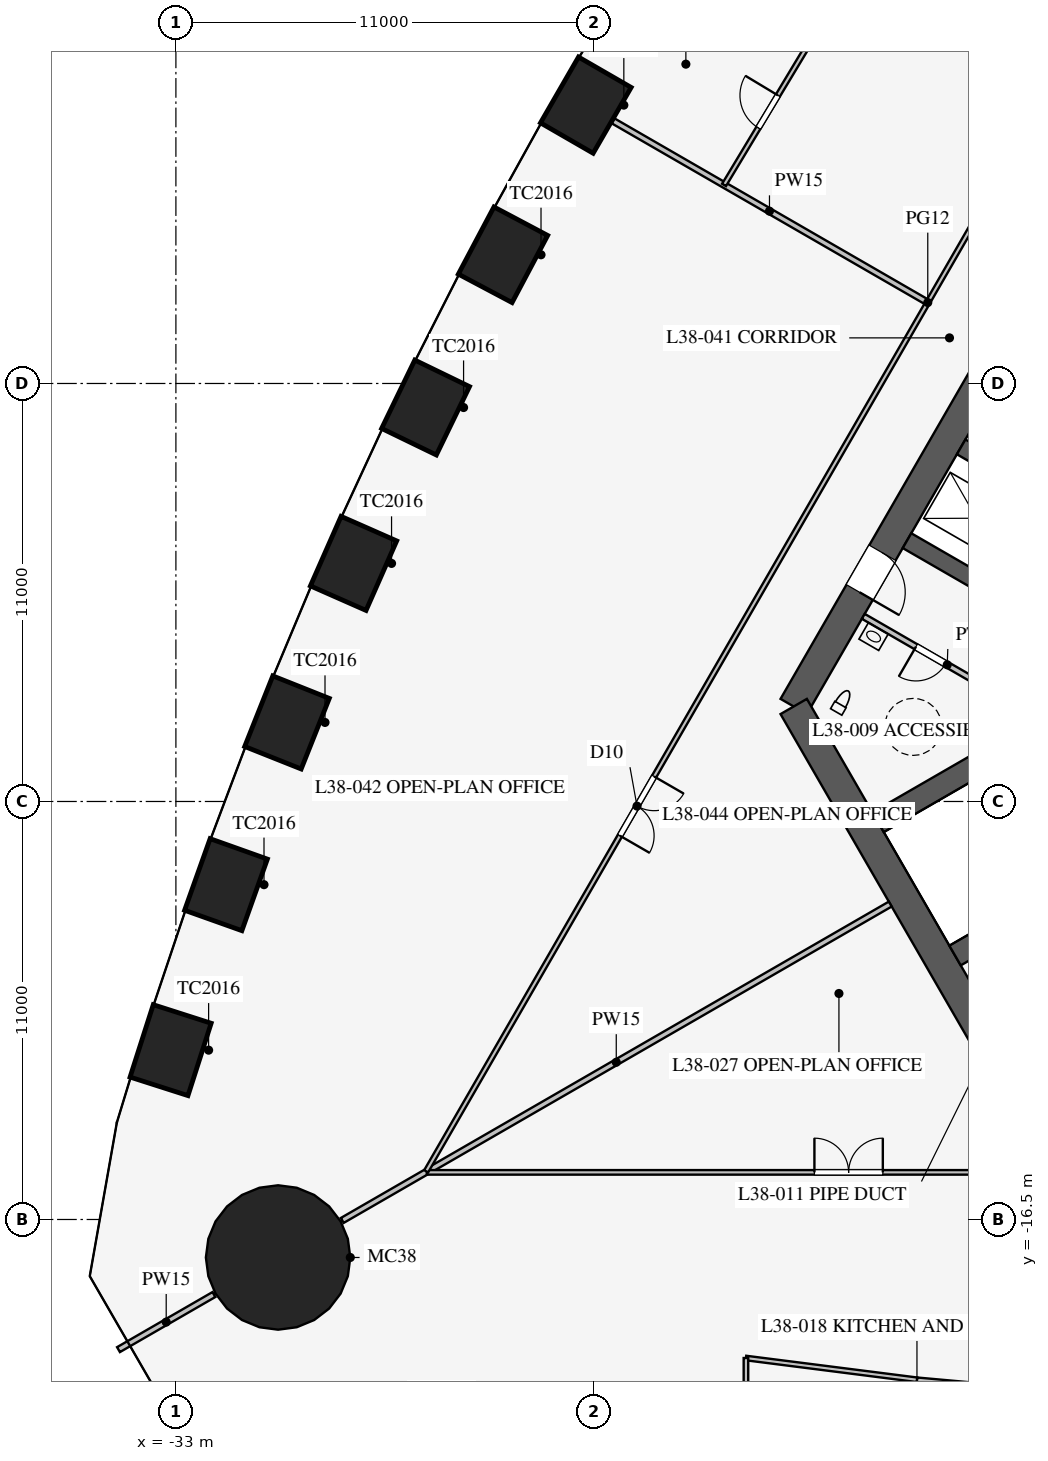
"""IFC4 building model, lengths in metres.
Left out: names, types, materials, properties, quantities, classifications, styles, units other than length and angle.
Written with IfcOpenShell. Run it as: python <this file> out.ifc"""

import sys

from ifc_helpers import new_model, si_unit, direction, frame, frame_2d, origin, origin_2d, place, context, subcontext, project, spatial, rectangle, circle, extrude, element, fill, save


model = new_model("IFC4")
c1 = context("Model", 3, precision=1e-05, world=origin(), true_north=direction((0.0, 1.0)))
c2 = subcontext(c1, "Body", "Model", "MODEL_VIEW")
j1 = project(units=[si_unit("LENGTHUNIT", "METRE"), si_unit("PLANEANGLEUNIT", "RADIAN")], contexts=[c1])
p1 = place(None, origin())
s1 = spatial("IfcSite", under=j1, at=p1, CompositionType="ELEMENT")
p2 = place(p1, origin())
s2 = spatial("IfcBuilding", under=s1, at=p2, CompositionType="ELEMENT")
p3 = place(p2, frame((0.0, 0.0, 166.1)))
s3 = spatial("IfcBuildingStorey", under=s2, at=p3, CompositionType="ELEMENT", Elevation=166.1)
for number, where, z_axis, x_axis in (
    (1, (-22.213, 12.825, 0.0), (0.0, 0.0, 1.0), (-0.5, -0.866, 0.0)),
    (2, (-24.393, 8.887, 0.0), (0.0, 0.0, 1.0), (-0.468, -0.883, 0.0)),
    (3, (-26.43, 4.867, 0.0), (0.0, 0.0, 1.0), (-0.436, -0.9, 0.0)),
    (4, (-28.325, 0.765, 0.0), (0.0, 0.0, 1.0), (-0.403, -0.915, 0.0)),
    (5, (-30.077, -3.42, 0.0), (0.0, 0.0, 1.0), (-0.37, -0.929, 0.0)),
    (6, (-31.682, -7.689, 0.0), (0.0, 0.0, 1.0), (-0.336, -0.942, 0.0)),
    (7, (-33.139, -12.044, 0.0), (0.0, 0.0, 1.0), (-0.305, -0.952, 0.0)),
):
    element("IfcColumn", number, at=place(p3, frame(where, z_axis=z_axis, x_axis=x_axis)), inside=s3, PredefinedType="COLUMN", context=c2, shape_type="SweptSolid", body=[
        extrude(rectangle(XDim=2.0, YDim=1.6, at=origin_2d()), origin(), (0.0, 0.0, 1.0), 4.2),
    ])
p4 = place(p3, frame((-30.311, -17.5, 0.0), z_axis=(0.0, 0.0, 1.0), x_axis=(1.0, 0.0, 0.0)))
e8 = element("IfcColumn", 8, at=p4, inside=s3, PredefinedType="COLUMN", context=c2, shape_type="SweptSolid", body=[
    extrude(circle(Radius=1.9, at=origin_2d()), origin(), (0.0, 0.0, 1.0), 4.2),
])
p5 = place(p3, frame((-5.773, 16.0, 0.0), z_axis=(0.0, 0.0, 1.0), x_axis=(-0.500002442456, -0.866023993627, 0.0)))
e9 = element("IfcWall", 9, at=p5, inside=s3, PredefinedType="SHEAR", context=c2, shape_type="SweptSolid", body=[
    extrude(rectangle(XDim=21.939, YDim=0.8, at=frame_2d((10.97, 0.0))), origin(), (0.0, 0.0, 1.0), 4.2),
])
p6 = place(p5, frame((17.27, 0.0, 0.0)))
e10 = element("IfcOpeningElement", 10, at=p6, cuts=e9, PredefinedType="OPENING", context=c2, shape_type="SweptSolid", body=[
    extrude(rectangle(XDim=1.2, YDim=2.1, at=frame_2d((0.6, 1.05))), frame((0.0, 0.41, 0.0), z_axis=(0.0, -1.0, 0.0), x_axis=(1.0, 0.0, 0.0)), (0.0, 0.0, 1.0), 0.82),
])
p7 = place(p5, frame((3.47, 0.0, 0.0)))
e11 = element("IfcOpeningElement", 11, at=p7, cuts=e9, PredefinedType="OPENING", context=c2, shape_type="SweptSolid", body=[
    extrude(rectangle(XDim=1.2, YDim=2.1, at=frame_2d((0.6, 1.05))), frame((0.0, 0.41, 0.0), z_axis=(0.0, -1.0, 0.0), x_axis=(1.0, 0.0, 0.0)), (0.0, 0.0, 1.0), 0.82),
])
p8 = place(p3, frame((-16.743, -3.0, 0.0), z_axis=(0.0, 0.0, 1.0), x_axis=(0.499995765644, -0.866027848477, 0.0)))
e12 = element("IfcWall", 12, at=p8, inside=s3, PredefinedType="SHEAR", context=c2, shape_type="SweptSolid", body=[
    extrude(rectangle(XDim=11.547, YDim=0.8, at=frame_2d((5.773, 0.0))), origin(), (0.0, 0.0, 1.0), 4.2),
])
for number, where, z_axis, x_axis in (
    (13, (-10.107, 2.544, 0.0), (0.0, 0.0, 1.0), (-0.866, 0.5, 0.0)),
    (14, (-11.532, 0.076, 0.0), (0.0, 0.0, 1.0), (-0.866, 0.5, 0.0)),
):
    element("IfcWall", number, at=place(p3, frame(where, z_axis=z_axis, x_axis=x_axis)), inside=s3, PredefinedType="SHEAR", context=c2, shape_type="SweptSolid", body=[
        extrude(rectangle(XDim=2.575, YDim=0.45, at=frame_2d((1.288, 0.0))), origin(), (0.0, 0.0, 1.0), 4.2),
    ])
for number, where, z_axis, x_axis in (
    (15, (-6.663, -1.509, 0.0), (0.0, 0.0, 1.0), (-0.866, -0.5, 0.0)),
    (16, (-4.638, -5.016, 0.0), (0.0, 0.0, 1.0), (-0.866, -0.5, 0.0)),
):
    element("IfcWall", number, at=place(p3, frame(where, z_axis=z_axis, x_axis=x_axis)), inside=s3, PredefinedType="SHEAR", context=c2, shape_type="SweptSolid", body=[
        extrude(rectangle(XDim=9.075, YDim=0.6, at=frame_2d((4.538, 0.0))), origin(), (0.0, 0.0, 1.0), 4.2),
    ])
p9 = place(p3, frame((-10.495, -3.178, 0.0), z_axis=(0.0, 0.0, 1.0), x_axis=(-0.86602216432, 0.500005610874, 0.0)))
e17 = element("IfcWall", 17, at=p9, inside=s3, PredefinedType="PARTITIONING", context=c2, shape_type="SweptSolid", body=[
    extrude(rectangle(XDim=5.1, YDim=0.15, at=frame_2d((2.55, 0.0))), origin(), (0.0, 0.0, 1.0), 4.0),
])
p10 = place(p9, frame((2.6, 0.0, 0.0)))
e18 = element("IfcOpeningElement", 18, at=p10, cuts=e17, PredefinedType="OPENING", context=c2, shape_type="SweptSolid", body=[
    extrude(rectangle(XDim=0.9, YDim=2.1, at=frame_2d((0.45, 1.05))), frame((0.0, 0.085, 0.0), z_axis=(0.0, -1.0, 0.0), x_axis=(1.0, 0.0, 0.0)), (0.0, 0.0, 1.0), 0.17),
])
p11 = place(p3, frame((-14.203, -8.2, 0.0), z_axis=(0.0, 0.0, 1.0), x_axis=(-0.866024668836, -0.500001272966, 0.0)))
e19 = element("IfcWall", 19, at=p11, inside=s3, PredefinedType="PARTITIONING", context=c2, shape_type="SweptSolid", body=[
    extrude(rectangle(XDim=16.65, YDim=0.15, at=frame_2d((8.325, 0.0))), origin(), (0.0, 0.0, 1.0), 2.3),
])
p12 = place(p3, frame((-32.0, -18.475, 0.0), z_axis=(0.0, 0.0, 1.0), x_axis=(-0.866042548026, -0.499970304126, 0.0)))
e20 = element("IfcWall", 20, at=p12, inside=s3, PredefinedType="PARTITIONING", context=c2, shape_type="SweptSolid", body=[
    extrude(rectangle(XDim=2.899, YDim=0.15, at=frame_2d((1.45, 0.0))), origin(), (0.0, 0.0, 1.0), 2.3),
])
p13 = place(p3, frame((-26.398, -15.26, 0.0), z_axis=(0.0, 0.0, 1.0), x_axis=(1.0, 0.0, 0.0)))
e21 = element("IfcWall", 21, at=p13, inside=s3, PredefinedType="PARTITIONING", context=c2, shape_type="SweptSolid", body=[
    extrude(rectangle(XDim=52.796, YDim=0.12, at=frame_2d((26.398, 0.0))), origin(), (0.0, 0.0, 1.0), 2.9),
])
p14 = place(p13, frame((10.2, 0.0, 0.15)))
e22 = element("IfcOpeningElement", 22, at=p14, cuts=e21, PredefinedType="OPENING", context=c2, shape_type="SweptSolid", body=[
    extrude(rectangle(XDim=1.8, YDim=2.1, at=frame_2d((0.9, 1.05))), frame((0.0, 0.07, 0.0), z_axis=(0.0, -1.0, 0.0), x_axis=(1.0, 0.0, 0.0)), (0.0, 0.0, 1.0), 0.14),
])
p15 = place(p13, frame((40.8, 0.0, 0.15)))
e23 = element("IfcOpeningElement", 23, at=p15, cuts=e21, PredefinedType="OPENING", context=c2, shape_type="SweptSolid", body=[
    extrude(rectangle(XDim=1.8, YDim=2.1, at=frame_2d((0.9, 1.05))), frame((0.0, 0.07, 0.0), z_axis=(0.0, -1.0, 0.0), x_axis=(1.0, 0.0, 0.0)), (0.0, 0.0, 1.0), 0.14),
])
p16 = place(p3, frame((-13.5, -20.718, 0.0), z_axis=(0.0, 0.0, 1.0), x_axis=(0.995930325215, -0.090126507295, 0.0)))
e24 = element("IfcWall", 24, at=p16, inside=s3, PredefinedType="PARTITIONING", context=c2, shape_type="SweptSolid", body=[
    extrude(rectangle(XDim=4.518, YDim=0.12, at=frame_2d((2.259, 0.0))), origin(), (0.0, 0.0, 1.0), 2.9),
])
p17 = place(p16, frame((1.35, 0.0, 0.15)))
e25 = element("IfcOpeningElement", 25, at=p17, cuts=e24, PredefinedType="OPENING", context=c2, shape_type="SweptSolid", body=[
    extrude(rectangle(XDim=1.8, YDim=2.1, at=frame_2d((0.9, 1.05))), frame((0.0, 0.07, 0.0), z_axis=(0.0, -1.0, 0.0), x_axis=(1.0, 0.0, 0.0)), (0.0, 0.0, 1.0), 0.14),
])
p18 = place(p3, frame((-18.0, -20.146, 0.0), z_axis=(0.0, 0.0, 1.0), x_axis=(0.992010652594, -0.12615413247, 0.0)))
e26 = element("IfcWall", 26, at=p18, inside=s3, PredefinedType="PARTITIONING", context=c2, shape_type="SweptSolid", body=[
    extrude(rectangle(XDim=4.536, YDim=0.12, at=frame_2d((2.268, 0.0))), origin(), (0.0, 0.0, 1.0), 2.9),
])
p19 = place(p3, frame((-18.0, -20.146, 0.0), z_axis=(0.0, 0.0, 1.0), x_axis=(0.0, -1.0, 0.0)))
e27 = element("IfcWall", 27, at=p19, inside=s3, PredefinedType="PARTITIONING", context=c2, shape_type="SweptSolid", body=[
    extrude(rectangle(XDim=3.353, YDim=0.12, at=frame_2d((1.677, 0.0))), origin(), (0.0, 0.0, 1.0), 2.8),
])
p20 = place(p3, frame((-13.268, 7.66, 0.0), z_axis=(0.0, 0.0, 1.0), x_axis=(-0.866013963754, 0.500019814191, 0.0)))
e28 = element("IfcWall", 28, at=p20, inside=s3, PredefinedType="PARTITIONING", context=c2, shape_type="SweptSolid", body=[
    extrude(rectangle(XDim=9.5, YDim=0.15, at=frame_2d((4.75, 0.0))), origin(), (0.0, 0.0, 1.0), 2.8),
])
p21 = place(p3, frame((-0.016, 30.491, 0.0), z_axis=(0.0, 0.0, 1.0), x_axis=(-0.50000091641, -0.866024874695, 0.0)))
e29 = element("IfcWall", 29, at=p21, inside=s3, PredefinedType="PARTITIONING", context=c2, shape_type="SweptSolid", body=[
    extrude(rectangle(XDim=52.796, YDim=0.12, at=frame_2d((26.398, 0.0))), origin(), (0.0, 0.0, 1.0), 2.9),
])
p22 = place(p21, frame((10.2, 0.0, 0.15)))
e30 = element("IfcOpeningElement", 30, at=p22, cuts=e29, PredefinedType="OPENING", context=c2, shape_type="SweptSolid", body=[
    extrude(rectangle(XDim=1.8, YDim=2.1, at=frame_2d((0.9, 1.05))), frame((0.0, 0.07, 0.0), z_axis=(0.0, -1.0, 0.0), x_axis=(1.0, 0.0, 0.0)), (0.0, 0.0, 1.0), 0.14),
])
p23 = place(p21, frame((40.8, 0.0, 0.15)))
e31 = element("IfcOpeningElement", 31, at=p23, cuts=e29, PredefinedType="OPENING", context=c2, shape_type="SweptSolid", body=[
    extrude(rectangle(XDim=1.8, YDim=2.1, at=frame_2d((0.9, 1.05))), frame((0.0, 0.07, 0.0), z_axis=(0.0, -1.0, 0.0), x_axis=(1.0, 0.0, 0.0)), (0.0, 0.0, 1.0), 0.14),
])
p24 = place(p3, frame((-16.256, 14.581, 0.0), z_axis=(0.0, 0.0, 1.0), x_axis=(-0.515548366618, -0.856860479703, 0.0)))
e32 = element("IfcWall", 32, at=p24, inside=s3, PredefinedType="PARTITIONING", context=c2, shape_type="SweptSolid", body=[
    extrude(rectangle(XDim=4.501, YDim=0.12, at=frame_2d((2.25, 0.0))), origin(), (0.0, 0.0, 1.0), 2.9),
])
p25 = place(p24, frame((1.75, 0.0, 0.15)))
e33 = element("IfcOpeningElement", 33, at=p25, cuts=e32, PredefinedType="OPENING", context=c2, shape_type="SweptSolid", body=[
    extrude(rectangle(XDim=1.0, YDim=2.1, at=frame_2d((0.5, 1.05))), frame((0.0, 0.07, 0.0), z_axis=(0.0, -1.0, 0.0), x_axis=(1.0, 0.0, 0.0)), (0.0, 0.0, 1.0), 0.14),
])
p26 = place(p10, origin())
e34 = element("IfcDoor", 34, at=p26, inside=s3, OperationType="SINGLE_SWING_RIGHT", PredefinedType="DOOR", context=c2, shape_type="SweptSolid", body=[
    extrude(rectangle(XDim=0.9, YDim=2.1, at=frame_2d((0.45, 1.05))), frame((0.0, 0.025, 0.0), z_axis=(0.0, -1.0, 0.0), x_axis=(1.0, 0.0, 0.0)), (0.0, 0.0, 1.0), 0.05),
])
fill(e18, e34)
p27 = place(p6, origin())
e35 = element("IfcDoor", 35, at=p27, inside=s3, OperationType="SINGLE_SWING_RIGHT", PredefinedType="DOOR", context=c2, shape_type="SweptSolid", body=[
    extrude(rectangle(XDim=1.2, YDim=2.1, at=frame_2d((0.6, 1.05))), frame((0.0, 0.025, 0.0), z_axis=(0.0, -1.0, 0.0), x_axis=(1.0, 0.0, 0.0)), (0.0, 0.0, 1.0), 0.05),
])
fill(e10, e35)
p28 = place(p14, origin())
e36 = element("IfcDoor", 36, at=p28, inside=s3, OperationType="DOUBLE_DOOR_SINGLE_SWING", PredefinedType="DOOR", context=c2, shape_type="SweptSolid", body=[
    extrude(rectangle(XDim=1.8, YDim=2.1, at=frame_2d((0.9, 1.05))), frame((0.0, 0.025, 0.0), z_axis=(0.0, -1.0, 0.0), x_axis=(1.0, 0.0, 0.0)), (0.0, 0.0, 1.0), 0.05),
])
fill(e22, e36)
p29 = place(p25, frame((1.0, 0.0, 0.0), z_axis=(0.0, 0.0, 1.0), x_axis=(-1.0, 0.0, 0.0)))
e37 = element("IfcDoor", 37, at=p29, inside=s3, OperationType="SINGLE_SWING_RIGHT", PredefinedType="DOOR", context=c2, shape_type="SweptSolid", body=[
    extrude(rectangle(XDim=1.0, YDim=2.1, at=frame_2d((0.5, 1.05))), frame((0.0, 0.025, 0.0), z_axis=(0.0, -1.0, 0.0), x_axis=(1.0, 0.0, 0.0)), (0.0, 0.0, 1.0), 0.05),
])
fill(e33, e37)
p30 = place(p23, origin())
e38 = element("IfcDoor", 38, at=p30, inside=s3, OperationType="DOUBLE_DOOR_SINGLE_SWING", PredefinedType="DOOR", context=c2, shape_type="SweptSolid", body=[
    extrude(rectangle(XDim=1.8, YDim=2.1, at=frame_2d((0.9, 1.05))), frame((0.0, 0.025, 0.0), z_axis=(0.0, -1.0, 0.0), x_axis=(1.0, 0.0, 0.0)), (0.0, 0.0, 1.0), 0.05),
])
fill(e31, e38)
save(model, sys.argv[1])
